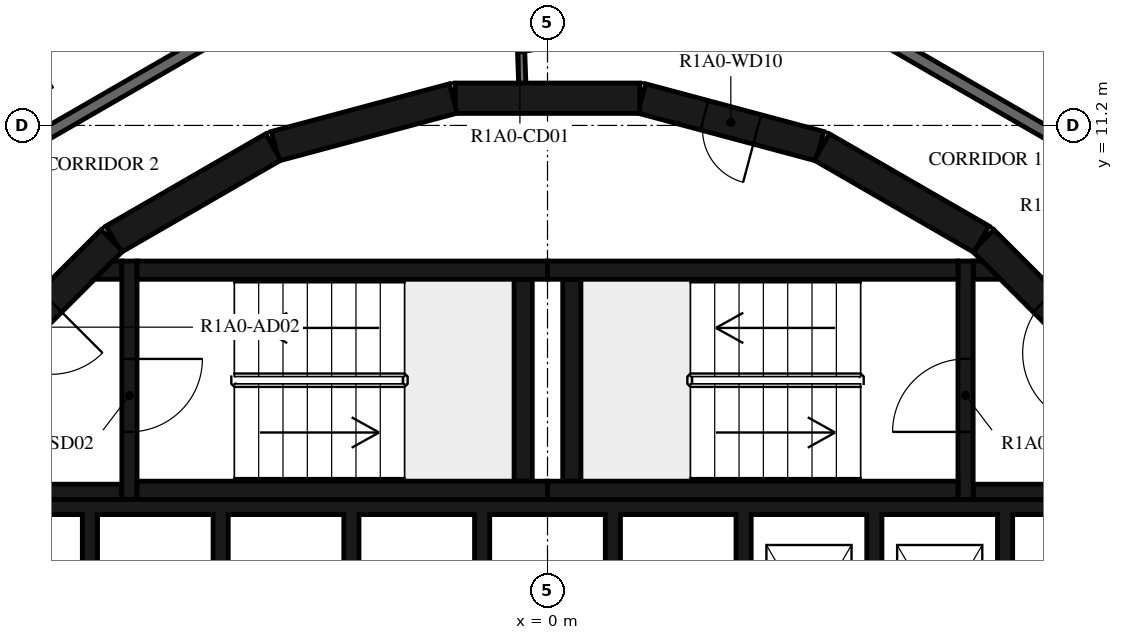
"""IFC4 building model, lengths in metres.
Left out: names, types, materials, properties, quantities, classifications, styles, units other than length and angle.
Written with IfcOpenShell. Run it as: python <this file> out.ifc"""

import sys

from ifc_helpers import new_model, si_unit, direction, frame, frame_2d, origin, place, context, subcontext, project, spatial, polyline, rectangle, outline, extrude, element, fill, save


model = new_model("IFC4")
c1 = context("Model", 3, precision=1e-05, world=origin(), true_north=direction((0.0, 1.0)))
c2 = subcontext(c1, "Body", "Model", "MODEL_VIEW")
j1 = project(units=[si_unit("LENGTHUNIT", "METRE"), si_unit("PLANEANGLEUNIT", "RADIAN")], contexts=[c1])
p1 = place(None, origin())
s1 = spatial("IfcSite", under=j1, at=p1, CompositionType="ELEMENT")
p2 = place(p1, origin())
s2 = spatial("IfcBuilding", under=s1, at=p2, CompositionType="ELEMENT")
p3 = place(p2, frame((0.0, 0.0, 45.4)))
s3 = spatial("IfcBuildingStorey", under=s2, at=p3, CompositionType="ELEMENT", Elevation=45.4)
p4 = place(p3, frame((9.308, 7.164, 0.0), z_axis=(0.0, 0.0, 1.0), x_axis=(-0.707106781187, 0.707106781187, 0.0)))
e1 = element("IfcWall", 1, at=p4, inside=s3, PredefinedType="SHEAR", context=c2, shape_type="SweptSolid", body=[
    extrude(rectangle(XDim=3.032, YDim=0.5, at=frame_2d((1.516, 0.0))), origin(), (0.0, 0.0, 1.0), 3.12),
])
p5 = place(p4, frame((0.416, 0.0, 0.0)))
e2 = element("IfcOpeningElement", 2, at=p5, cuts=e1, PredefinedType="OPENING", context=c2, shape_type="SweptSolid", body=[
    extrude(rectangle(XDim=1.2, YDim=2.1, at=frame_2d((0.6, 1.05))), frame((0.0, 0.26, 0.0), z_axis=(0.0, -1.0, 0.0), x_axis=(1.0, 0.0, 0.0)), (0.0, 0.0, 1.0), 0.52),
])
p6 = place(p3, frame((7.137, 9.329, 0.0), z_axis=(0.0, 0.0, 1.0), x_axis=(-0.865975092491, 0.500087131594, 0.0)))
e3 = element("IfcWall", 3, at=p6, inside=s3, PredefinedType="SHEAR", context=c2, shape_type="SweptSolid", body=[
    extrude(rectangle(XDim=3.033, YDim=0.5, at=frame_2d((1.516, 0.0))), origin(), (0.0, 0.0, 1.0), 3.12),
])
p7 = place(p3, frame((4.479, 10.858, 0.0), z_axis=(0.0, 0.0, 1.0), x_axis=(-0.965948410781, 0.258734743916, 0.0)))
e4 = element("IfcWall", 4, at=p7, inside=s3, PredefinedType="SHEAR", context=c2, shape_type="SweptSolid", body=[
    extrude(rectangle(XDim=3.033, YDim=0.5, at=frame_2d((1.516, 0.0))), origin(), (0.0, 0.0, 1.0), 3.12),
])
p8 = place(p7, frame((1.066, 0.0, 0.0)))
e5 = element("IfcOpeningElement", 5, at=p8, cuts=e4, PredefinedType="OPENING", context=c2, shape_type="SweptSolid", body=[
    extrude(rectangle(XDim=0.9, YDim=2.1, at=frame_2d((0.45, 1.05))), frame((0.0, 0.26, 0.0), z_axis=(0.0, -1.0, 0.0), x_axis=(1.0, 0.0, 0.0)), (0.0, 0.0, 1.0), 0.52),
])
for number, where, z_axis, x_axis in (
    (6, (1.516, 11.647, 0.0), (0.0, 0.0, 1.0), (-1.0, 0.0, 0.0)),
    (7, (-1.55, 11.643, 0.0), (0.0, 0.0, 1.0), (-0.966, -0.259, 0.0)),
    (8, (-4.51, 10.845, 0.0), (0.0, 0.0, 1.0), (-0.866, -0.5, 0.0)),
):
    element("IfcWall", number, at=place(p3, frame(where, z_axis=z_axis, x_axis=x_axis)), inside=s3, PredefinedType="SHEAR", context=c2, shape_type="SweptSolid", body=[
        extrude(rectangle(XDim=3.033, YDim=0.5, at=frame_2d((1.516, 0.0))), origin(), (0.0, 0.0, 1.0), 3.12),
    ])
p9 = place(p3, frame((-7.164, 9.308, 0.0), z_axis=(0.0, 0.0, 1.0), x_axis=(-0.707106781187, -0.707106781187, 0.0)))
e9 = element("IfcWall", 9, at=p9, inside=s3, PredefinedType="SHEAR", context=c2, shape_type="SweptSolid", body=[
    extrude(rectangle(XDim=3.032, YDim=0.5, at=frame_2d((1.516, 0.0))), origin(), (0.0, 0.0, 1.0), 3.12),
])
p10 = place(p9, frame((1.416, 0.0, 0.0)))
e10 = element("IfcOpeningElement", 10, at=p10, cuts=e9, PredefinedType="OPENING", context=c2, shape_type="SweptSolid", body=[
    extrude(rectangle(XDim=1.2, YDim=2.1, at=frame_2d((0.6, 1.05))), frame((0.0, 0.26, 0.0), z_axis=(0.0, -1.0, 0.0), x_axis=(1.0, 0.0, 0.0)), (0.0, 0.0, 1.0), 0.52),
])
for number, where, z_axis, x_axis in (
    (11, (0.0, 5.2, 0.0), (0.0, 0.0, 1.0), (1.0, 0.0, 0.0)),
    (12, (0.0, 8.82, 0.0), (0.0, 0.0, 1.0), (1.0, 0.0, 0.0)),
):
    element("IfcWall", number, at=place(p3, frame(where, z_axis=z_axis, x_axis=x_axis)), inside=s3, PredefinedType="SHEAR", context=c2, shape_type="SweptSolid", body=[
        extrude(rectangle(XDim=6.75, YDim=0.3, at=frame_2d((3.375, 0.0))), origin(), (0.0, 0.0, 1.0), 3.12),
    ])
p11 = place(p3, frame((0.4, 5.35, 0.0), z_axis=(0.0, 0.0, 1.0), x_axis=(0.0, 1.0, 0.0)))
e13 = element("IfcWall", 13, at=p11, inside=s3, PredefinedType="SHEAR", context=c2, shape_type="SweptSolid", body=[
    extrude(rectangle(XDim=3.32, YDim=0.3, at=frame_2d((1.66, 0.0))), origin(), (0.0, 0.0, 1.0), 3.12),
])
p12 = place(p3, frame((6.875, 5.05, 0.0), z_axis=(0.0, 0.0, 1.0), x_axis=(0.0, 1.0, 0.0)))
e14 = element("IfcWall", 14, at=p12, inside=s3, PredefinedType="SHEAR", context=c2, shape_type="SweptSolid", body=[
    extrude(rectangle(XDim=3.92, YDim=0.25, at=frame_2d((1.96, 0.0))), origin(), (0.0, 0.0, 1.0), 3.12),
])
p13 = place(p12, frame((1.11, 0.0, 0.0)))
e15 = element("IfcOpeningElement", 15, at=p13, cuts=e14, PredefinedType="OPENING", context=c2, shape_type="SweptSolid", body=[
    extrude(rectangle(XDim=1.2, YDim=2.1, at=frame_2d((0.6, 1.05))), frame((0.0, 0.135, 0.0), z_axis=(0.0, -1.0, 0.0), x_axis=(1.0, 0.0, 0.0)), (0.0, 0.0, 1.0), 0.27),
])
p14 = place(p3, frame((7.0, 5.175, 0.0), z_axis=(0.0, 0.0, 1.0), x_axis=(1.0, 0.0, 0.0)))
e16 = element("IfcWall", 16, at=p14, inside=s3, PredefinedType="SHEAR", context=c2, shape_type="SweptSolid", body=[
    extrude(rectangle(XDim=3.1, YDim=0.25, at=frame_2d((1.55, 0.0))), origin(), (0.0, 0.0, 1.0), 3.12),
])
p15 = place(p3, origin())
e17 = element("IfcWall", 17, at=p15, inside=s3, PredefinedType="SHEAR", context=c2, shape_type="SweptSolid", body=[
    extrude(outline(polyline([(7.448, 8.67), (7.0, 8.67), (7.0, 8.97), (7.148, 8.97), (7.448, 8.67)])), origin(), (0.0, 0.0, 1.0), 3.12),
])
for number, where, z_axis, x_axis in (
    (18, (-6.75, 5.2, 0.0), (0.0, 0.0, 1.0), (1.0, 0.0, 0.0)),
    (19, (-6.75, 8.82, 0.0), (0.0, 0.0, 1.0), (1.0, 0.0, 0.0)),
):
    element("IfcWall", number, at=place(p3, frame(where, z_axis=z_axis, x_axis=x_axis)), inside=s3, PredefinedType="SHEAR", context=c2, shape_type="SweptSolid", body=[
        extrude(rectangle(XDim=6.75, YDim=0.3, at=frame_2d((3.375, 0.0))), origin(), (0.0, 0.0, 1.0), 3.12),
    ])
p16 = place(p3, frame((-0.4, 5.35, 0.0), z_axis=(0.0, 0.0, 1.0), x_axis=(0.0, 1.0, 0.0)))
e20 = element("IfcWall", 20, at=p16, inside=s3, PredefinedType="SHEAR", context=c2, shape_type="SweptSolid", body=[
    extrude(rectangle(XDim=3.32, YDim=0.3, at=frame_2d((1.66, 0.0))), origin(), (0.0, 0.0, 1.0), 3.12),
])
p17 = place(p3, frame((-6.875, 8.97, 0.0), z_axis=(0.0, 0.0, 1.0), x_axis=(0.0, -1.0, 0.0)))
e21 = element("IfcWall", 21, at=p17, inside=s3, PredefinedType="SHEAR", context=c2, shape_type="SweptSolid", body=[
    extrude(rectangle(XDim=3.92, YDim=0.25, at=frame_2d((1.96, 0.0))), origin(), (0.0, 0.0, 1.0), 3.12),
])
p18 = place(p17, frame((1.61, 0.0, 0.0)))
e22 = element("IfcOpeningElement", 22, at=p18, cuts=e21, PredefinedType="OPENING", context=c2, shape_type="SweptSolid", body=[
    extrude(rectangle(XDim=1.2, YDim=2.1, at=frame_2d((0.6, 1.05))), frame((0.0, 0.135, 0.0), z_axis=(0.0, -1.0, 0.0), x_axis=(1.0, 0.0, 0.0)), (0.0, 0.0, 1.0), 0.27),
])
p19 = place(p3, frame((-7.0, 5.175, 0.0), z_axis=(0.0, 0.0, 1.0), x_axis=(-1.0, 0.0, 0.0)))
e23 = element("IfcWall", 23, at=p19, inside=s3, PredefinedType="SHEAR", context=c2, shape_type="SweptSolid", body=[
    extrude(rectangle(XDim=3.1, YDim=0.25, at=frame_2d((1.55, 0.0))), origin(), (0.0, 0.0, 1.0), 3.12),
])
p20 = place(p3, origin())
e24 = element("IfcWall", 24, at=p20, inside=s3, PredefinedType="SHEAR", context=c2, shape_type="SweptSolid", body=[
    extrude(outline(polyline([(-7.148, 8.97), (-7.0, 8.97), (-7.0, 8.67), (-7.448, 8.67), (-7.148, 8.97)])), origin(), (0.0, 0.0, 1.0), 3.12),
])
p21 = place(p3, origin())
e25 = element("IfcWall", 25, at=p21, inside=s3, PredefinedType="SHEAR", context=c2, shape_type="SweptSolid", body=[
    extrude(outline(polyline([(-9.55, 4.8), (-7.65, 4.8), (-7.65, 1.9), (-7.4, 1.9), (-7.4, 4.8), (-5.5, 4.8), (-5.5, 1.9), (-5.25, 1.9), (-5.25, 4.8), (-3.35, 4.8), (-3.35, 1.9), (-3.1, 1.9), (-3.1, 4.8), (-1.2, 4.8), (-1.2, 1.9), (-0.95, 1.9), (-0.95, 4.8), (0.95, 4.8), (0.95, 1.9), (1.2, 1.9), (1.2, 4.8), (3.1, 4.8), (3.1, 1.9), (3.35, 1.9), (3.35, 4.8), (5.25, 4.8), (5.25, 1.9), (5.5, 1.9), (5.5, 4.8), (7.4, 4.8), (7.4, 1.9), (7.65, 1.9), (7.65, 4.8), (9.55, 4.8), (9.55, 1.9), (9.8, 1.9), (9.8, 4.8), (9.8, 5.05), (-9.8, 5.05), (-9.8, 4.8), (-9.8, 1.9), (-9.55, 1.9), (-9.55, 4.8)])), origin(), (0.0, 0.0, 1.0), 3.12),
])
p22 = place(p3, frame((-0.479, 13.7, 0.0), z_axis=(0.0, 0.0, 1.0), x_axis=(0.034919103017, -0.999390142159, 0.0)))
e26 = element("IfcWall", 26, at=p22, inside=s3, PredefinedType="PARTITIONING", context=c2, shape_type="SweptSolid", body=[
    extrude(rectangle(XDim=1.804, YDim=0.12, at=frame_2d((0.902, 0.0))), origin(), (0.0, 0.0, 1.0), 3.12),
])
p23 = place(p22, frame((0.11, 0.0, 0.0)))
e27 = element("IfcOpeningElement", 27, at=p23, cuts=e26, PredefinedType="OPENING", context=c2, shape_type="SweptSolid", body=[
    extrude(rectangle(XDim=1.2, YDim=2.1, at=frame_2d((0.6, 1.05))), frame((0.0, 0.07, 0.0), z_axis=(0.0, -1.0, 0.0), x_axis=(1.0, 0.0, 0.0)), (0.0, 0.0, 1.0), 0.14),
])
p24 = place(p3, frame((10.029, 10.029, 0.0), z_axis=(0.0, 0.0, 1.0), x_axis=(-0.866024439905, 0.500001669485, 0.0)))
e28 = element("IfcWall", 28, at=p24, inside=s3, PredefinedType="STANDARD", context=c2, shape_type="SweptSolid", body=[
    extrude(rectangle(XDim=7.342, YDim=0.2, at=frame_2d((3.671, 0.0))), origin(), (0.0, 0.0, 1.0), 3.12),
])
p25 = place(p3, frame((-3.671, 13.7, 0.0), z_axis=(0.0, 0.0, 1.0), x_axis=(-0.866031419417, -0.499989580474, 0.0)))
e29 = element("IfcWall", 29, at=p25, inside=s3, PredefinedType="STANDARD", context=c2, shape_type="SweptSolid", body=[
    extrude(rectangle(XDim=7.147, YDim=0.2, at=frame_2d((3.573, 0.0))), origin(), (0.0, 0.0, 1.0), 3.12),
])
p26 = place(p25, frame((5.947, 0.0, 0.0)))
e30 = element("IfcOpeningElement", 30, at=p26, cuts=e29, PredefinedType="OPENING", context=c2, shape_type="SweptSolid", body=[
    extrude(rectangle(XDim=1.0, YDim=2.1, at=frame_2d((0.5, 1.05))), frame((0.0, 0.11, 0.0), z_axis=(0.0, -1.0, 0.0), x_axis=(1.0, 0.0, 0.0)), (0.0, 0.0, 1.0), 0.22),
])
p27 = place(p3, frame((11.139, 11.167, 0.0), z_axis=(0.0, 0.0, 1.0), x_axis=(-0.499994660107, 0.866028486751, 0.0)))
e31 = element("IfcWall", 31, at=p27, inside=s3, PredefinedType="PARTITIONING", context=c2, shape_type="SweptSolid", body=[
    extrude(rectangle(XDim=15.786, YDim=0.12, at=frame_2d((7.893, 0.0))), origin(), (0.0, 0.0, 1.0), 3.12),
])
p28 = place(p27, frame((5.279, 0.0, 0.0)))
e32 = element("IfcOpeningElement", 32, at=p28, cuts=e31, PredefinedType="OPENING", context=c2, shape_type="SweptSolid", body=[
    extrude(rectangle(XDim=0.9, YDim=2.1, at=frame_2d((0.45, 1.05))), frame((0.0, 0.07, 0.0), z_axis=(0.0, -1.0, 0.0), x_axis=(1.0, 0.0, 0.0)), (0.0, 0.0, 1.0), 0.14),
])
p29 = place(p27, frame((12.23, 0.0, 0.0)))
e33 = element("IfcOpeningElement", 33, at=p29, cuts=e31, PredefinedType="OPENING", context=c2, shape_type="SweptSolid", body=[
    extrude(rectangle(XDim=0.9, YDim=2.1, at=frame_2d((0.45, 1.05))), frame((0.0, 0.07, 0.0), z_axis=(0.0, -1.0, 0.0), x_axis=(1.0, 0.0, 0.0)), (0.0, 0.0, 1.0), 0.14),
])
p30 = place(p3, frame((11.127, 11.127, 0.0), z_axis=(0.0, 0.0, 1.0), x_axis=(-0.866043916853, 0.499967933054, 0.0)))
e34 = element("IfcWall", 34, at=p30, inside=s3, PredefinedType="PARTITIONING", context=c2, shape_type="SweptSolid", body=[
    extrude(rectangle(XDim=4.821, YDim=0.12, at=frame_2d((2.411, 0.0))), origin(), (0.0, 0.0, 1.0), 3.12),
])
p31 = place(p30, frame((1.4, 0.0, 0.0)))
e35 = element("IfcOpeningElement", 35, at=p31, cuts=e34, PredefinedType="OPENING", context=c2, shape_type="SweptSolid", body=[
    extrude(rectangle(XDim=0.8, YDim=2.1, at=frame_2d((0.4, 1.05))), frame((0.0, 0.07, 0.0), z_axis=(0.0, -1.0, 0.0), x_axis=(1.0, 0.0, 0.0)), (0.0, 0.0, 1.0), 0.14),
])
p32 = place(p3, frame((-4.073, 15.2, 0.0), z_axis=(0.0, 0.0, 1.0), x_axis=(-0.866024802457, -0.500001041529, 0.0)))
e36 = element("IfcWall", 36, at=p32, inside=s3, PredefinedType="PARTITIONING", context=c2, shape_type="SweptSolid", body=[
    extrude(rectangle(XDim=6.751, YDim=0.12, at=frame_2d((3.376, 0.0))), origin(), (0.0, 0.0, 1.0), 3.12),
])
p33 = place(p32, frame((0.2, 0.0, 0.0)))
e37 = element("IfcOpeningElement", 37, at=p33, cuts=e36, PredefinedType="OPENING", context=c2, shape_type="SweptSolid", body=[
    extrude(rectangle(XDim=0.8, YDim=2.1, at=frame_2d((0.4, 1.05))), frame((0.0, 0.07, 0.0), z_axis=(0.0, -1.0, 0.0), x_axis=(1.0, 0.0, 0.0)), (0.0, 0.0, 1.0), 0.14),
])
p34 = place(p32, frame((5.206, 0.0, 0.0)))
e38 = element("IfcOpeningElement", 38, at=p34, cuts=e36, PredefinedType="OPENING", context=c2, shape_type="SweptSolid", body=[
    extrude(rectangle(XDim=0.9, YDim=2.1, at=frame_2d((0.45, 1.05))), frame((0.0, 0.07, 0.0), z_axis=(0.0, -1.0, 0.0), x_axis=(1.0, 0.0, 0.0)), (0.0, 0.0, 1.0), 0.14),
])
p35 = place(p13, origin())
e39 = element("IfcDoor", 39, at=p35, inside=s3, OperationType="SINGLE_SWING_LEFT", PredefinedType="DOOR", context=c2, shape_type="SweptSolid", body=[
    extrude(rectangle(XDim=1.2, YDim=2.1, at=frame_2d((0.6, 1.05))), frame((0.0, 0.025, 0.0), z_axis=(0.0, -1.0, 0.0), x_axis=(1.0, 0.0, 0.0)), (0.0, 0.0, 1.0), 0.05),
])
fill(e15, e39)
p36 = place(p5, origin())
e40 = element("IfcDoor", 40, at=p36, inside=s3, OperationType="SINGLE_SWING_RIGHT", PredefinedType="DOOR", context=c2, shape_type="SweptSolid", body=[
    extrude(rectangle(XDim=1.2, YDim=2.1, at=frame_2d((0.6, 1.05))), frame((0.0, 0.025, 0.0), z_axis=(0.0, -1.0, 0.0), x_axis=(1.0, 0.0, 0.0)), (0.0, 0.0, 1.0), 0.05),
])
fill(e2, e40)
p37 = place(p18, origin())
e41 = element("IfcDoor", 41, at=p37, inside=s3, OperationType="SINGLE_SWING_LEFT", PredefinedType="DOOR", context=c2, shape_type="SweptSolid", body=[
    extrude(rectangle(XDim=1.2, YDim=2.1, at=frame_2d((0.6, 1.05))), frame((0.0, 0.025, 0.0), z_axis=(0.0, -1.0, 0.0), x_axis=(1.0, 0.0, 0.0)), (0.0, 0.0, 1.0), 0.05),
])
fill(e22, e41)
p38 = place(p10, origin())
e42 = element("IfcDoor", 42, at=p38, inside=s3, OperationType="SINGLE_SWING_RIGHT", PredefinedType="DOOR", context=c2, shape_type="SweptSolid", body=[
    extrude(rectangle(XDim=1.2, YDim=2.1, at=frame_2d((0.6, 1.05))), frame((0.0, 0.025, 0.0), z_axis=(0.0, -1.0, 0.0), x_axis=(1.0, 0.0, 0.0)), (0.0, 0.0, 1.0), 0.05),
])
fill(e10, e42)
p39 = place(p8, origin())
e43 = element("IfcDoor", 43, at=p39, inside=s3, OperationType="SINGLE_SWING_LEFT", PredefinedType="DOOR", context=c2, shape_type="SweptSolid", body=[
    extrude(rectangle(XDim=0.9, YDim=2.1, at=frame_2d((0.45, 1.05))), frame((0.0, 0.025, 0.0), z_axis=(0.0, -1.0, 0.0), x_axis=(1.0, 0.0, 0.0)), (0.0, 0.0, 1.0), 0.05),
])
fill(e5, e43)
p40 = place(p23, origin())
e44 = element("IfcDoor", 44, at=p40, inside=s3, OperationType="DOUBLE_DOOR_SINGLE_SWING", PredefinedType="DOOR", context=c2, shape_type="SweptSolid", body=[
    extrude(rectangle(XDim=1.2, YDim=2.1, at=frame_2d((0.6, 1.05))), frame((0.0, 0.025, 0.0), z_axis=(0.0, -1.0, 0.0), x_axis=(1.0, 0.0, 0.0)), (0.0, 0.0, 1.0), 0.05),
])
fill(e27, e44)
save(model, sys.argv[1])
